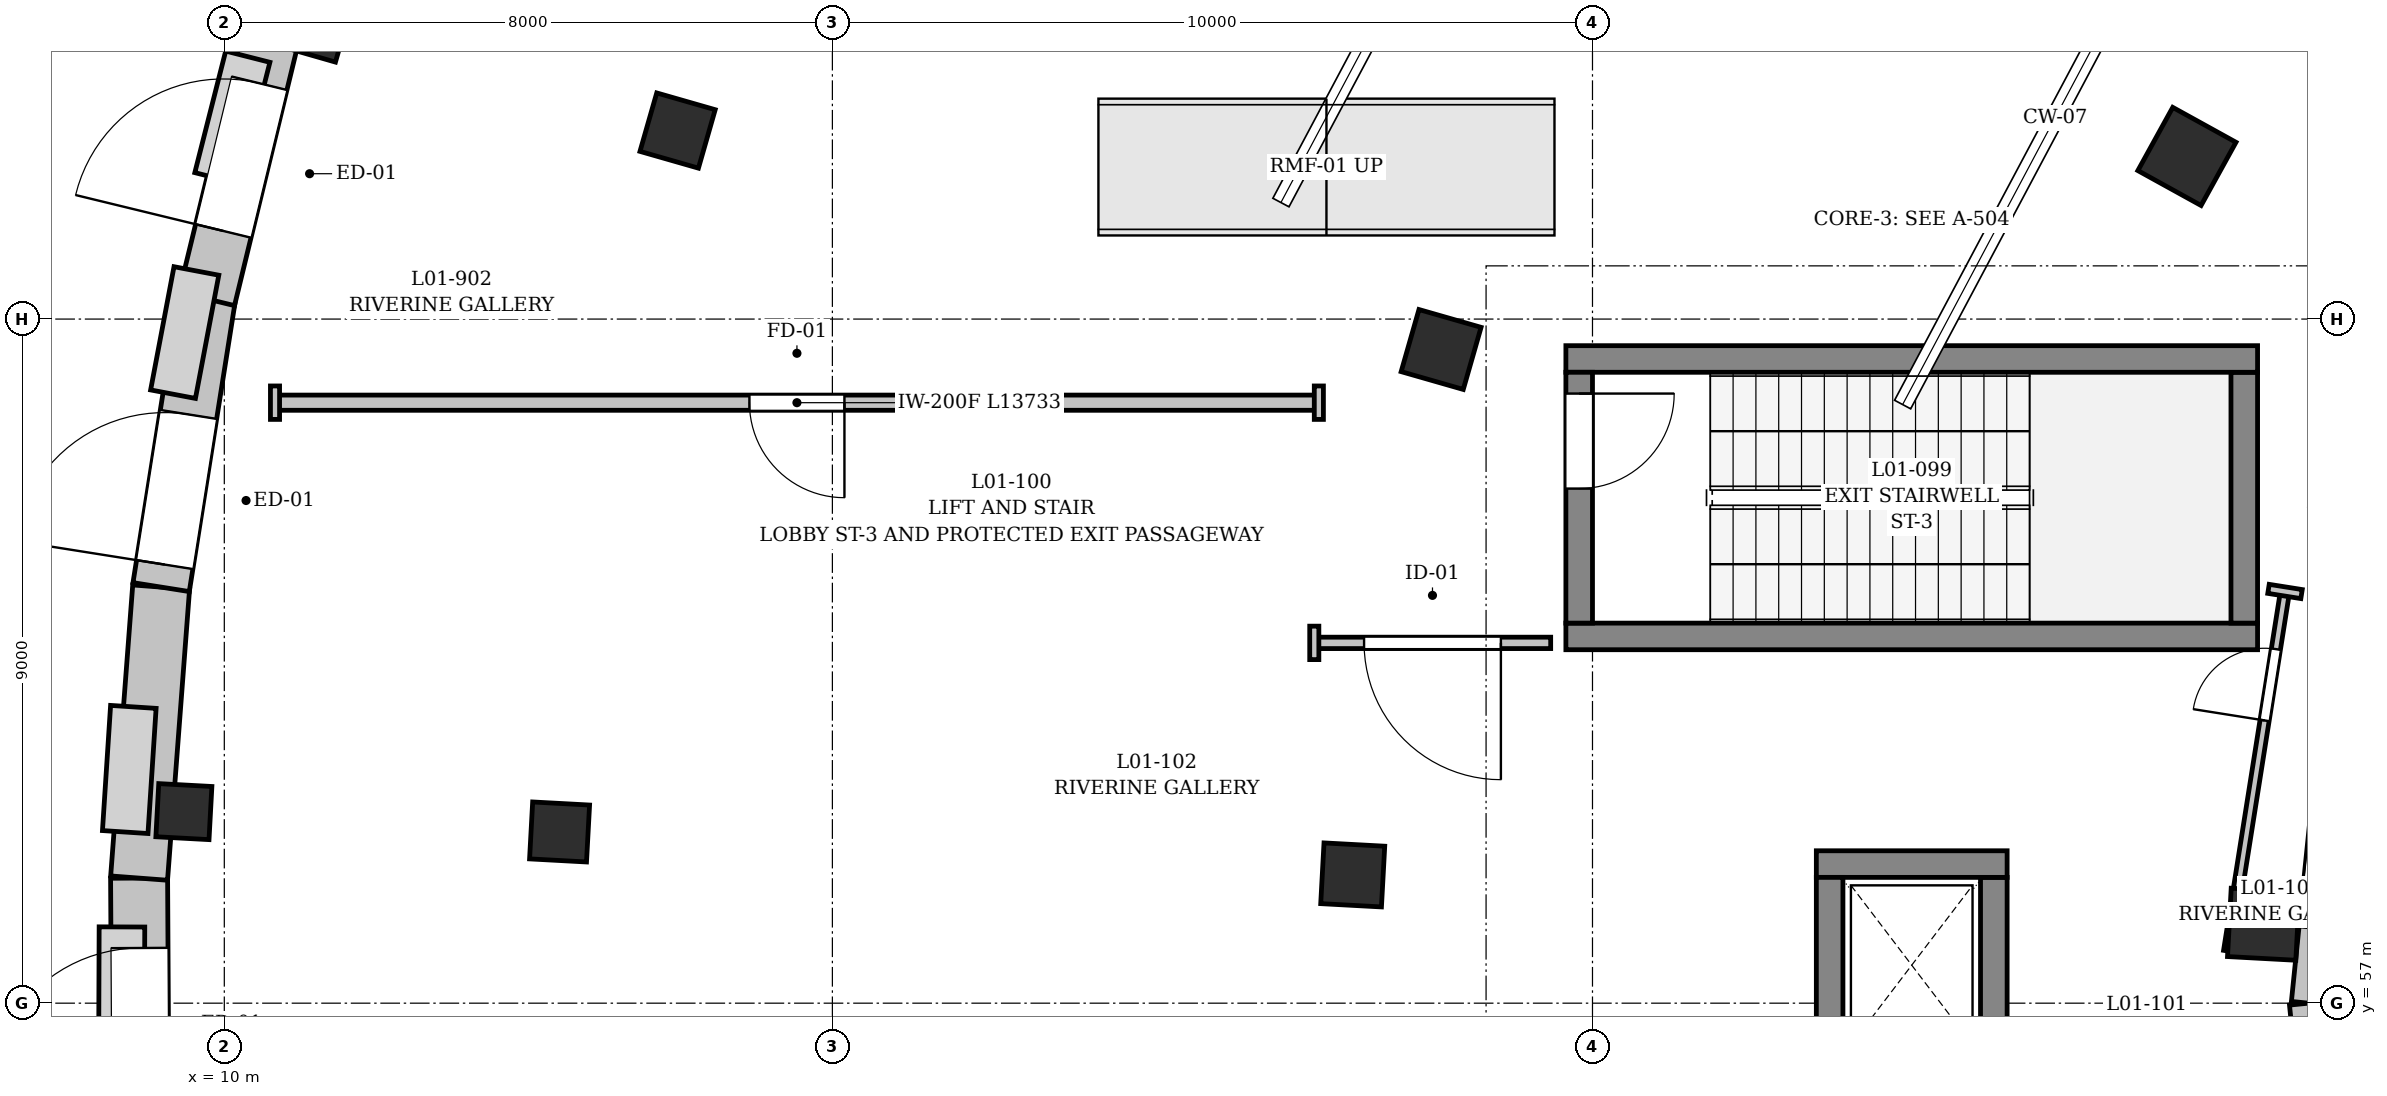
"""IFC4 building model, lengths in metres.
Left out: names, types, materials, properties, quantities, classifications, styles, units other than length and angle.
Written with IfcOpenShell. Run it as: python <this file> out.ifc"""

import sys

from ifc_helpers import new_model, si_unit, direction, frame, frame_2d, origin, origin_2d, place, context, subcontext, project, spatial, rectangle, extrude, element, fill, save


model = new_model("IFC4")
c1 = context("Model", 3, precision=1e-05, world=origin(), true_north=direction((0.0, 1.0)))
c2 = subcontext(c1, "Body", "Model", "MODEL_VIEW")
j1 = project(units=[si_unit("LENGTHUNIT", "METRE"), si_unit("PLANEANGLEUNIT", "RADIAN")], contexts=[c1])
p1 = place(None, origin())
s1 = spatial("IfcSite", under=j1, at=p1, CompositionType="ELEMENT")
p2 = place(p1, origin())
s2 = spatial("IfcBuilding", under=s1, at=p2, CompositionType="ELEMENT")
p3 = place(p2, origin())
s3 = spatial("IfcBuildingStorey", under=s2, at=p3, CompositionType="ELEMENT", Elevation=0.0)
p4 = place(p3, frame((35.821, 68.14, 0.0), z_axis=(0.0, 0.0, 1.0), x_axis=(-0.875464527, 0.483282383255, 0.0)))
e1 = element("IfcColumn", 1, at=p4, inside=s3, PredefinedType="COLUMN", context=c2, shape_type="SweptSolid", body=[
    extrude(rectangle(XDim=0.95, YDim=0.95, at=origin_2d()), origin(), (0.0, 0.0, 1.0), 5.1),
])
p5 = place(p3, frame((26.009, 65.6, 0.0), z_axis=(0.0, 0.0, 1.0), x_axis=(-0.961261695938, 0.275637355817, 0.0)))
e2 = element("IfcColumn", 2, at=p5, inside=s3, PredefinedType="COLUMN", context=c2, shape_type="SweptSolid", body=[
    extrude(rectangle(XDim=0.85, YDim=0.85, at=origin_2d()), origin(), (0.0, 0.0, 1.0), 5.1),
])
p6 = place(p3, frame((15.963, 68.48, 0.0), z_axis=(0.0, 0.0, 1.0), x_axis=(-0.961261695938, 0.275637355817, 0.0)))
e3 = element("IfcColumn", 3, at=p6, inside=s3, PredefinedType="COLUMN", context=c2, shape_type="SweptSolid", body=[
    extrude(rectangle(XDim=0.8, YDim=0.8, at=origin_2d()), origin(), (0.0, 0.0, 1.0), 5.1),
])
p7 = place(p3, frame((11.205, 69.845, 0.0), z_axis=(0.0, 0.0, 1.0), x_axis=(-0.961261695938, 0.275637355817, 0.0)))
e4 = element("IfcColumn", 4, at=p7, inside=s3, PredefinedType="COLUMN", context=c2, shape_type="SweptSolid", body=[
    extrude(rectangle(XDim=0.75, YDim=0.75, at=origin_2d()), origin(), (0.0, 0.0, 1.0), 5.1),
])
p8 = place(p3, frame((36.828, 58.038, 0.0), z_axis=(0.0, 0.0, 1.0), x_axis=(-0.998536670326, 0.054078812985, 0.0)))
e5 = element("IfcColumn", 5, at=p8, inside=s3, PredefinedType="COLUMN", context=c2, shape_type="SweptSolid", body=[
    extrude(rectangle(XDim=0.9, YDim=0.9, at=origin_2d()), origin(), (0.0, 0.0, 1.0), 5.1),
])
p9 = place(p3, frame((24.846, 58.687, 0.0), z_axis=(0.0, 0.0, 1.0), x_axis=(-0.998536670326, 0.054078812985, 0.0)))
e6 = element("IfcColumn", 6, at=p9, inside=s3, PredefinedType="COLUMN", context=c2, shape_type="SweptSolid", body=[
    extrude(rectangle(XDim=0.8, YDim=0.8, at=origin_2d()), origin(), (0.0, 0.0, 1.0), 5.1),
])
p10 = place(p3, frame((14.411, 59.252, 0.0), z_axis=(0.0, 0.0, 1.0), x_axis=(-0.998536670326, 0.054078812985, 0.0)))
e7 = element("IfcColumn", 7, at=p10, inside=s3, PredefinedType="COLUMN", context=c2, shape_type="SweptSolid", body=[
    extrude(rectangle(XDim=0.75, YDim=0.75, at=origin_2d()), origin(), (0.0, 0.0, 1.0), 5.1),
])
p11 = place(p3, frame((9.468, 59.52, 0.0), z_axis=(0.0, 0.0, 1.0), x_axis=(-0.998536670326, 0.054078812985, 0.0)))
e8 = element("IfcColumn", 8, at=p11, inside=s3, PredefinedType="COLUMN", context=c2, shape_type="SweptSolid", body=[
    extrude(rectangle(XDim=0.7, YDim=0.7, at=origin_2d()), origin(), (0.0, 0.0, 1.0), 5.1),
])
p12 = place(p3, frame((37.792, 60.649, 0.0), z_axis=(0.0, 0.0, 1.0), x_axis=(-0.101618529077, -0.994823438882, 0.0)))
e9 = element("IfcWall", 9, at=p12, inside=s3, PredefinedType="SOLIDWALL", context=c2, shape_type="SweptSolid", body=[
    extrude(rectangle(XDim=3.669, YDim=0.45, at=frame_2d((1.834, 0.0))), origin(), (0.0, 0.0, 1.0), 4.44),
])
p13 = place(p12, frame((0.984, 0.0, 0.9)))
e10 = element("IfcOpeningElement", 10, at=p13, cuts=e9, PredefinedType="OPENING", context=c2, shape_type="SweptSolid", body=[
    extrude(rectangle(XDim=1.7, YDim=1.55, at=frame_2d((0.85, 0.775))), frame((0.0, 0.235, 0.0), z_axis=(0.0, -1.0, 0.0), x_axis=(1.0, 0.0, 0.0)), (0.0, 0.0, 1.0), 0.47),
])
p14 = place(p3, frame((37.419, 57.0, 0.0), z_axis=(0.0, 0.0, 1.0), x_axis=(0.09912244439, -0.995075243898, 0.0)))
e11 = element("IfcWall", 11, at=p14, inside=s3, PredefinedType="SOLIDWALL", context=c2, shape_type="SweptSolid", body=[
    extrude(rectangle(XDim=3.424, YDim=0.5, at=frame_2d((1.712, 0.0))), origin(), (0.0, 0.0, 1.0), 5.1),
])
p15 = place(p14, frame((0.962, 0.0, 0.9)))
e12 = element("IfcOpeningElement", 12, at=p15, cuts=e11, PredefinedType="OPENING", context=c2, shape_type="SweptSolid", body=[
    extrude(rectangle(XDim=1.5, YDim=2.1, at=frame_2d((0.75, 1.05))), frame((0.0, 0.26, 0.0), z_axis=(0.0, -1.0, 0.0), x_axis=(1.0, 0.0, 0.0)), (0.0, 0.0, 1.0), 0.52),
])
p16 = place(p3, frame((8.901, 54.806, 0.0), z_axis=(0.0, 0.0, 1.0), x_axis=(-0.005850456312, 0.999982885934, 0.0)))
e13 = element("IfcWall", 13, at=p16, inside=s3, PredefinedType="SOLIDWALL", context=c2, shape_type="SweptSolid", body=[
    extrude(rectangle(XDim=3.839, YDim=0.75, at=frame_2d((1.919, 0.0))), origin(), (0.0, 0.0, 1.0), 5.1),
])
p17 = place(p16, frame((0.92, 0.0, 0.0)))
e14 = element("IfcOpeningElement", 14, at=p17, cuts=e13, PredefinedType="OPENING", context=c2, shape_type="SweptSolid", body=[
    extrude(rectangle(XDim=2.0, YDim=2.5, at=frame_2d((1.0, 1.25))), frame((0.0, 0.385, 0.0), z_axis=(0.0, -1.0, 0.0), x_axis=(1.0, 0.0, 0.0)), (0.0, 0.0, 1.0), 0.77),
])
p18 = place(p3, frame((8.879, 58.646, 0.0), z_axis=(0.0, 0.0, 1.0), x_axis=(0.075612006837, 0.997137314728, 0.0)))
e15 = element("IfcWall", 15, at=p18, inside=s3, PredefinedType="SOLIDWALL", context=c2, shape_type="SweptSolid", body=[
    extrude(rectangle(XDim=3.839, YDim=0.75, at=frame_2d((1.919, 0.0))), origin(), (0.0, 0.0, 1.0), 4.09),
])
p19 = place(p3, frame((9.169, 62.474, 0.0), z_axis=(0.0, 0.0, 1.0), x_axis=(0.156432782226, 0.987688607125, 0.0)))
e16 = element("IfcWall", 16, at=p19, inside=s3, PredefinedType="SOLIDWALL", context=c2, shape_type="SweptSolid", body=[
    extrude(rectangle(XDim=3.839, YDim=0.75, at=frame_2d((1.92, 0.0))), origin(), (0.0, 0.0, 1.0), 5.1),
])
p20 = place(p19, frame((0.3, 0.0, 0.0)))
e17 = element("IfcOpeningElement", 17, at=p20, cuts=e16, PredefinedType="OPENING", context=c2, shape_type="SweptSolid", body=[
    extrude(rectangle(XDim=2.0, YDim=2.5, at=frame_2d((1.0, 1.25))), frame((0.0, 0.385, 0.0), z_axis=(0.0, -1.0, 0.0), x_axis=(1.0, 0.0, 0.0)), (0.0, 0.0, 1.0), 0.77),
])
p21 = place(p3, frame((9.77, 66.266, 0.0), z_axis=(0.0, 0.0, 1.0), x_axis=(0.236246101935, 0.971693253718, 0.0)))
e18 = element("IfcWall", 18, at=p21, inside=s3, PredefinedType="SOLIDWALL", context=c2, shape_type="SweptSolid", body=[
    extrude(rectangle(XDim=3.839, YDim=0.75, at=frame_2d((1.919, 0.0))), origin(), (0.0, 0.0, 1.0), 4.09),
])
p22 = place(p21, frame((0.92, 0.0, 0.0)))
e19 = element("IfcOpeningElement", 19, at=p22, cuts=e18, PredefinedType="OPENING", context=c2, shape_type="SweptSolid", body=[
    extrude(rectangle(XDim=2.0, YDim=2.5, at=frame_2d((1.0, 1.25))), frame((0.0, 0.385, 0.0), z_axis=(0.0, -1.0, 0.0), x_axis=(1.0, 0.0, 0.0)), (0.0, 0.0, 1.0), 0.77),
])
p23 = place(p3, frame((27.65, 61.825, 0.0), z_axis=(0.0, 0.0, 1.0), x_axis=(1.0, 0.0, 0.0)))
e20 = element("IfcWall", 20, at=p23, inside=s3, PredefinedType="SHEAR", context=c2, shape_type="SweptSolid", body=[
    extrude(rectangle(XDim=9.1, YDim=0.35, at=frame_2d((4.55, 0.0))), origin(), (0.0, 0.0, 1.0), 5.1),
])
p24 = place(p3, frame((36.575, 62.0, 0.0), z_axis=(0.0, 0.0, 1.0), x_axis=(0.0, 1.0, 0.0)))
e21 = element("IfcWall", 21, at=p24, inside=s3, PredefinedType="SHEAR", context=c2, shape_type="SweptSolid", body=[
    extrude(rectangle(XDim=3.3, YDim=0.35, at=frame_2d((1.65, 0.0))), origin(), (0.0, 0.0, 1.0), 5.1),
])
p25 = place(p3, frame((36.75, 65.475, 0.0), z_axis=(0.0, 0.0, 1.0), x_axis=(-1.0, 0.0, 0.0)))
e22 = element("IfcWall", 22, at=p25, inside=s3, PredefinedType="SHEAR", context=c2, shape_type="SweptSolid", body=[
    extrude(rectangle(XDim=9.1, YDim=0.35, at=frame_2d((4.55, 0.0))), origin(), (0.0, 0.0, 1.0), 5.1),
])
p26 = place(p3, frame((27.825, 65.3, 0.0), z_axis=(0.0, 0.0, 1.0), x_axis=(0.0, -1.0, 0.0)))
e23 = element("IfcWall", 23, at=p26, inside=s3, PredefinedType="SHEAR", context=c2, shape_type="SweptSolid", body=[
    extrude(rectangle(XDim=3.3, YDim=0.35, at=frame_2d((1.65, 0.0))), origin(), (0.0, 0.0, 1.0), 5.1),
])
p27 = place(p26, frame((0.28, 0.0, 0.0)))
e24 = element("IfcOpeningElement", 24, at=p27, cuts=e23, PredefinedType="OPENING", context=c2, shape_type="SweptSolid", body=[
    extrude(rectangle(XDim=1.25, YDim=2.2, at=frame_2d((0.625, 1.1))), frame((0.0, 0.185, 0.0), z_axis=(0.0, -1.0, 0.0), x_axis=(1.0, 0.0, 0.0)), (0.0, 0.0, 1.0), 0.37),
])
p28 = place(p3, frame((33.28, 56.345, 0.0), z_axis=(0.0, 0.0, 1.0), x_axis=(0.0, 1.0, 0.0)))
e25 = element("IfcWall", 25, at=p28, inside=s3, PredefinedType="SHEAR", context=c2, shape_type="SweptSolid", body=[
    extrude(rectangle(XDim=2.31, YDim=0.35, at=frame_2d((1.155, 0.0))), origin(), (0.0, 0.0, 1.0), 5.1),
])
p29 = place(p3, frame((33.455, 58.83, 0.0), z_axis=(0.0, 0.0, 1.0), x_axis=(-1.0, 0.0, 0.0)))
e26 = element("IfcWall", 26, at=p29, inside=s3, PredefinedType="SHEAR", context=c2, shape_type="SweptSolid", body=[
    extrude(rectangle(XDim=2.51, YDim=0.35, at=frame_2d((1.255, 0.0))), origin(), (0.0, 0.0, 1.0), 5.1),
])
p30 = place(p3, frame((31.12, 58.655, 0.0), z_axis=(0.0, 0.0, 1.0), x_axis=(0.0, -1.0, 0.0)))
e27 = element("IfcWall", 27, at=p30, inside=s3, PredefinedType="SHEAR", context=c2, shape_type="SweptSolid", body=[
    extrude(rectangle(XDim=2.31, YDim=0.35, at=frame_2d((1.155, 0.0))), origin(), (0.0, 0.0, 1.0), 5.1),
])
p31 = place(p3, frame((24.4, 64.9, 0.0), z_axis=(0.0, 0.0, 1.0), x_axis=(-1.0, 0.0, 0.0)))
e28 = element("IfcWall", 28, at=p31, inside=s3, PredefinedType="PARTITIONING", context=c2, shape_type="SweptSolid", body=[
    extrude(rectangle(XDim=13.733, YDim=0.2, at=frame_2d((6.866, 0.0))), origin(), (0.0, 0.0, 1.0), 4.44),
])
p32 = place(p31, frame((6.241, 0.0, 0.0)))
e29 = element("IfcOpeningElement", 29, at=p32, cuts=e28, PredefinedType="OPENING", context=c2, shape_type="SweptSolid", body=[
    extrude(rectangle(XDim=1.25, YDim=2.2, at=frame_2d((0.625, 1.1))), frame((0.0, 0.11, 0.0), z_axis=(0.0, -1.0, 0.0), x_axis=(1.0, 0.0, 0.0)), (0.0, 0.0, 1.0), 0.22),
])
p33 = place(p3, frame((36.362, 57.686, 0.0), z_axis=(0.0, 0.0, 1.0), x_axis=(0.156391852422, 0.987695088829, 0.0)))
e30 = element("IfcWall", 30, at=p33, inside=s3, PredefinedType="PARTITIONING", context=c2, shape_type="SweptSolid", body=[
    extrude(rectangle(XDim=4.789, YDim=0.12, at=frame_2d((2.395, 0.0))), origin(), (0.0, 0.0, 1.0), 4.09),
])
p34 = place(p33, frame((3.072, 0.0, 0.0)))
e31 = element("IfcOpeningElement", 31, at=p34, cuts=e30, PredefinedType="OPENING", context=c2, shape_type="SweptSolid", body=[
    extrude(rectangle(XDim=0.95, YDim=2.2, at=frame_2d((0.475, 1.1))), frame((0.0, 0.07, 0.0), z_axis=(0.0, -1.0, 0.0), x_axis=(1.0, 0.0, 0.0)), (0.0, 0.0, 1.0), 0.14),
])
p35 = place(p3, frame((27.45, 61.74, 0.0), z_axis=(0.0, 0.0, 1.0), x_axis=(-1.0, 0.0, 0.0)))
e32 = element("IfcWall", 32, at=p35, inside=s3, PredefinedType="PARTITIONING", context=c2, shape_type="SweptSolid", body=[
    extrude(rectangle(XDim=3.11, YDim=0.15, at=frame_2d((1.555, 0.0))), origin(), (0.0, 0.0, 1.0), 4.44),
])
p36 = place(p35, frame((0.655, 0.0, 0.0)))
e33 = element("IfcOpeningElement", 33, at=p36, cuts=e32, PredefinedType="OPENING", context=c2, shape_type="SweptSolid", body=[
    extrude(rectangle(XDim=1.8, YDim=2.4, at=frame_2d((0.9, 1.2))), frame((0.0, 0.085, 0.0), z_axis=(0.0, -1.0, 0.0), x_axis=(1.0, 0.0, 0.0)), (0.0, 0.0, 1.0), 0.17),
])
for number, where, z_axis, x_axis in (
    (34, (24.4, 65.12, 0.0), (0.0, 0.0, 1.0), (0.0, -1.0, 0.0)),
    (35, (10.667, 65.12, 0.0), (0.0, 0.0, 1.0), (0.0, -1.0, 0.0)),
    (36, (37.329, 62.382, 0.0), (0.0, 0.0, 1.0), (-0.988, 0.156, 0.0)),
):
    element("IfcWall", number, at=place(p3, frame(where, z_axis=z_axis, x_axis=x_axis)), inside=s3, PredefinedType="PARTITIONING", context=c2, shape_type="SweptSolid", body=[
        extrude(rectangle(XDim=0.44, YDim=0.12, at=frame_2d((0.22, 0.0))), origin(), (0.0, 0.0, 1.0), 5.1),
    ])
p37 = place(p3, frame((24.34, 61.96, 0.0), z_axis=(0.0, 0.0, 1.0), x_axis=(0.0, -1.0, 0.0)))
e37 = element("IfcWall", 37, at=p37, inside=s3, PredefinedType="PARTITIONING", context=c2, shape_type="SweptSolid", body=[
    extrude(rectangle(XDim=0.44, YDim=0.12, at=frame_2d((0.22, 0.0))), origin(), (0.0, 0.0, 1.0), 5.1),
])
p38 = place(p17, origin())
e38 = element("IfcDoor", 38, at=p38, inside=s3, OperationType="DOUBLE_DOOR_SINGLE_SWING", PredefinedType="DOOR", context=c2, shape_type="SweptSolid", body=[
    extrude(rectangle(XDim=2.0, YDim=2.5, at=frame_2d((1.0, 1.25))), frame((0.0, 0.025, 0.0), z_axis=(0.0, -1.0, 0.0), x_axis=(1.0, 0.0, 0.0)), (0.0, 0.0, 1.0), 0.05),
])
fill(e14, e38)
p39 = place(p22, origin())
e39 = element("IfcDoor", 39, at=p39, inside=s3, OperationType="DOUBLE_DOOR_SINGLE_SWING", PredefinedType="DOOR", context=c2, shape_type="SweptSolid", body=[
    extrude(rectangle(XDim=2.0, YDim=2.5, at=frame_2d((1.0, 1.25))), frame((0.0, 0.025, 0.0), z_axis=(0.0, -1.0, 0.0), x_axis=(1.0, 0.0, 0.0)), (0.0, 0.0, 1.0), 0.05),
])
fill(e19, e39)
p40 = place(p20, origin())
e40 = element("IfcDoor", 40, at=p40, inside=s3, OperationType="DOUBLE_DOOR_SINGLE_SWING", PredefinedType="DOOR", context=c2, shape_type="SweptSolid", body=[
    extrude(rectangle(XDim=2.0, YDim=2.5, at=frame_2d((1.0, 1.25))), frame((0.0, 0.025, 0.0), z_axis=(0.0, -1.0, 0.0), x_axis=(1.0, 0.0, 0.0)), (0.0, 0.0, 1.0), 0.05),
])
fill(e17, e40)
p41 = place(p27, origin())
e41 = element("IfcDoor", 41, at=p41, inside=s3, OperationType="SINGLE_SWING_RIGHT", PredefinedType="DOOR", context=c2, shape_type="SweptSolid", body=[
    extrude(rectangle(XDim=1.25, YDim=2.2, at=frame_2d((0.625, 1.1))), frame((0.0, 0.025, 0.0), z_axis=(0.0, -1.0, 0.0), x_axis=(1.0, 0.0, 0.0)), (0.0, 0.0, 1.0), 0.05),
])
fill(e24, e41)
p42 = place(p32, origin())
e42 = element("IfcDoor", 42, at=p42, inside=s3, OperationType="SINGLE_SWING_LEFT", PredefinedType="DOOR", context=c2, shape_type="SweptSolid", body=[
    extrude(rectangle(XDim=1.25, YDim=2.2, at=frame_2d((0.625, 1.1))), frame((0.0, 0.025, 0.0), z_axis=(0.0, -1.0, 0.0), x_axis=(1.0, 0.0, 0.0)), (0.0, 0.0, 1.0), 0.05),
])
fill(e29, e42)
p43 = place(p34, origin())
e43 = element("IfcDoor", 43, at=p43, inside=s3, OperationType="SINGLE_SWING_RIGHT", PredefinedType="DOOR", context=c2, shape_type="SweptSolid", body=[
    extrude(rectangle(XDim=0.95, YDim=2.2, at=frame_2d((0.475, 1.1))), frame((0.0, 0.025, 0.0), z_axis=(0.0, -1.0, 0.0), x_axis=(1.0, 0.0, 0.0)), (0.0, 0.0, 1.0), 0.05),
])
fill(e31, e43)
p44 = place(p36, origin())
e44 = element("IfcDoor", 44, at=p44, inside=s3, OperationType="DOUBLE_DOOR_SINGLE_SWING", PredefinedType="DOOR", context=c2, shape_type="SweptSolid", body=[
    extrude(rectangle(XDim=1.8, YDim=2.4, at=frame_2d((0.9, 1.2))), frame((0.0, 0.025, 0.0), z_axis=(0.0, -1.0, 0.0), x_axis=(1.0, 0.0, 0.0)), (0.0, 0.0, 1.0), 0.05),
])
fill(e33, e44)
save(model, sys.argv[1])
